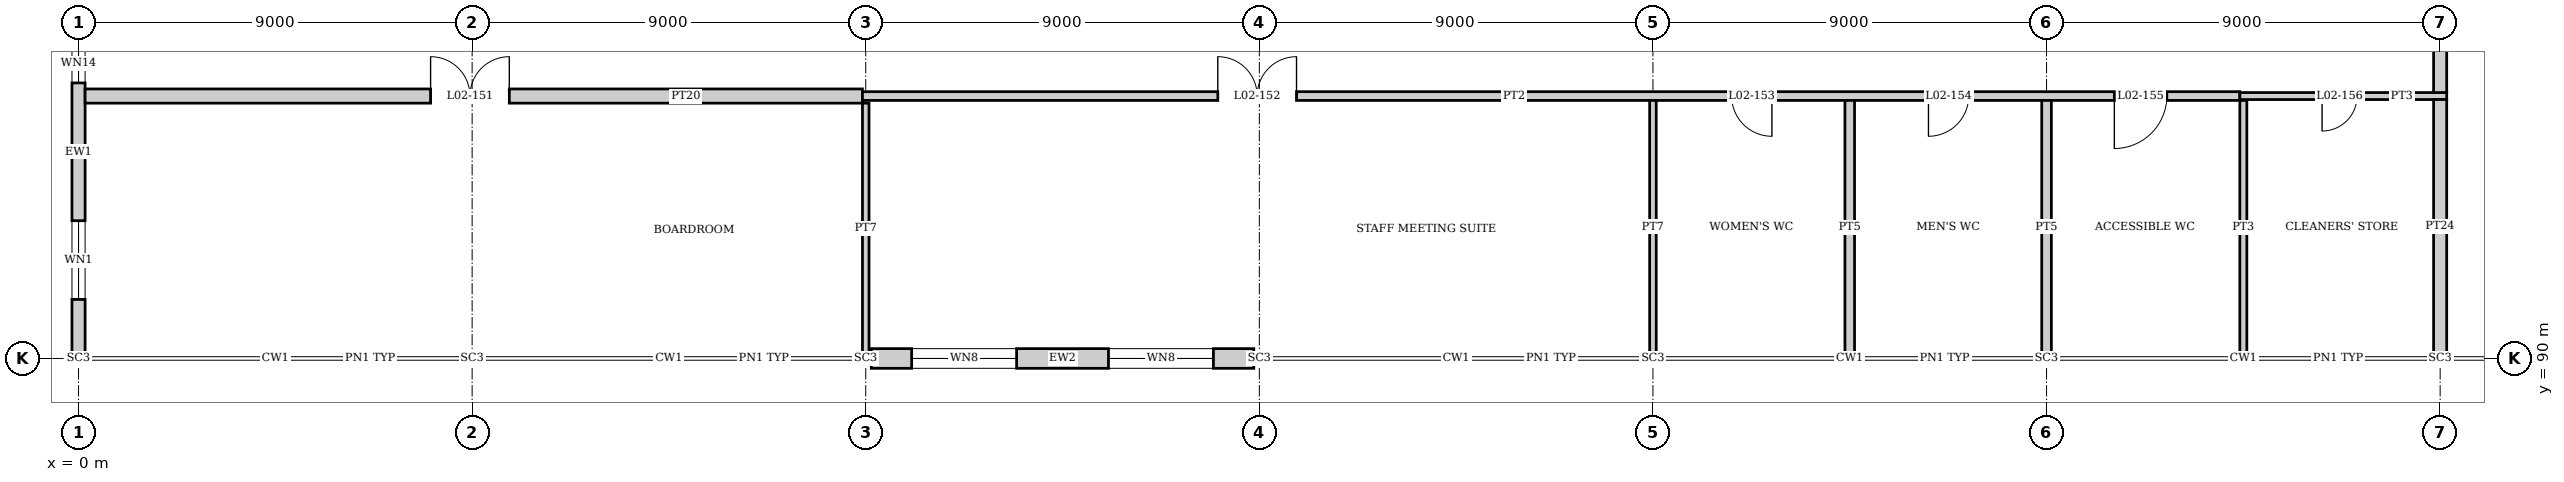
"""IFC4 building model, lengths in metres.
Left out: names, types, materials, properties, quantities, classifications, styles, units other than length and angle.
Written with IfcOpenShell. Run it as: python <this file> out.ifc"""

import sys

from ifc_helpers import new_model, si_unit, direction, frame, frame_2d, origin, origin_2d, place, context, subcontext, project, spatial, rectangle, i_section, extrude, element, fill, save


model = new_model("IFC4")
c1 = context("Model", 3, precision=1e-05, world=origin(), true_north=direction((0.0, 1.0)))
c2 = subcontext(c1, "Body", "Model", "MODEL_VIEW")
j1 = project(units=[si_unit("LENGTHUNIT", "METRE"), si_unit("PLANEANGLEUNIT", "RADIAN")], contexts=[c1])
p1 = place(None, origin())
s1 = spatial("IfcSite", under=j1, at=p1, CompositionType="ELEMENT")
p2 = place(p1, origin())
s2 = spatial("IfcBuilding", under=s1, at=p2, CompositionType="ELEMENT")
p3 = place(p2, frame((0.0, 0.0, 10.5)))
s3 = spatial("IfcBuildingStorey", under=s2, at=p3, CompositionType="ELEMENT", Elevation=10.5)
for number, where, z_axis, x_axis in (
    (1, (0.0, 90.0, 0.0), (0.0, 0.0, 1.0), (0.0, 1.0, 0.0)),
    (2, (9.0, 90.0, 0.0), (0.0, 0.0, 1.0), (0.0, 1.0, 0.0)),
    (3, (18.0, 90.0, 0.0), (0.0, 0.0, 1.0), (0.0, 1.0, 0.0)),
    (4, (27.0, 90.0, 0.0), (0.0, 0.0, 1.0), (0.0, 1.0, 0.0)),
    (5, (36.0, 90.0, 0.0), (0.0, 0.0, 1.0), (0.0, 1.0, 0.0)),
    (6, (45.0, 90.0, 0.0), (0.0, 0.0, 1.0), (0.0, 1.0, 0.0)),
    (7, (54.0, 90.0, 0.0), (0.0, 0.0, 1.0), (0.0, 1.0, 0.0)),
):
    element("IfcColumn", number, at=place(p3, frame(where, z_axis=z_axis, x_axis=x_axis)), inside=s3, PredefinedType="COLUMN", context=c2, shape_type="SweptSolid", body=[
        extrude(i_section(OverallWidth=0.254, OverallDepth=0.254, WebThickness=0.009, FlangeThickness=0.014, at=origin_2d()), origin(), (0.0, 0.0, 1.0), 4.5),
    ])
p4 = place(p3, frame((18.127, 90.0, 0.0), z_axis=(0.0, 0.0, 1.0), x_axis=(1.0, 0.0, 0.0)))
e8 = element("IfcWall", 8, at=p4, inside=s3, PredefinedType="SOLIDWALL", context=c2, shape_type="SweptSolid", body=[
    extrude(rectangle(XDim=8.746, YDim=0.45, at=frame_2d((4.373, 0.0))), origin(), (0.0, 0.0, 1.0), 3.991),
])
p5 = place(p4, frame((0.923, 0.0, 0.9)))
e9 = element("IfcOpeningElement", 9, at=p5, cuts=e8, PredefinedType="OPENING", context=c2, shape_type="SweptSolid", body=[
    extrude(rectangle(XDim=2.4, YDim=2.1, at=frame_2d((1.2, 1.05))), frame((0.0, 0.235, 0.0), z_axis=(0.0, -1.0, 0.0), x_axis=(1.0, 0.0, 0.0)), (0.0, 0.0, 1.0), 0.47),
])
p6 = place(p4, frame((5.423, 0.0, 0.9)))
e10 = element("IfcOpeningElement", 10, at=p6, cuts=e8, PredefinedType="OPENING", context=c2, shape_type="SweptSolid", body=[
    extrude(rectangle(XDim=2.4, YDim=2.1, at=frame_2d((1.2, 1.05))), frame((0.0, 0.235, 0.0), z_axis=(0.0, -1.0, 0.0), x_axis=(1.0, 0.0, 0.0)), (0.0, 0.0, 1.0), 0.47),
])
p7 = place(p3, frame((0.0, 90.127, 0.0), z_axis=(0.0, 0.0, 1.0), x_axis=(0.0, 1.0, 0.0)))
e11 = element("IfcWall", 11, at=p7, inside=s3, PredefinedType="SOLIDWALL", context=c2, shape_type="SweptSolid", body=[
    extrude(rectangle(XDim=8.873, YDim=0.3, at=frame_2d((4.437, 0.0))), origin(), (0.0, 0.0, 1.0), 3.991),
])
p8 = place(p7, frame((1.223, 0.0, 0.9)))
e12 = element("IfcOpeningElement", 12, at=p8, cuts=e11, PredefinedType="OPENING", context=c2, shape_type="SweptSolid", body=[
    extrude(rectangle(XDim=1.8, YDim=2.4, at=frame_2d((0.9, 1.2))), frame((0.0, 0.16, 0.0), z_axis=(0.0, -1.0, 0.0), x_axis=(1.0, 0.0, 0.0)), (0.0, 0.0, 1.0), 0.32),
])
p9 = place(p7, frame((6.173, 0.0, 0.6)))
e13 = element("IfcOpeningElement", 13, at=p9, cuts=e11, PredefinedType="OPENING", context=c2, shape_type="SweptSolid", body=[
    extrude(rectangle(XDim=0.9, YDim=2.7, at=frame_2d((0.45, 1.35))), frame((0.0, 0.16, 0.0), z_axis=(0.0, -1.0, 0.0), x_axis=(1.0, 0.0, 0.0)), (0.0, 0.0, 1.0), 0.32),
])
p10 = place(p3, frame((0.15, 96.0, 0.0), z_axis=(0.0, 0.0, 1.0), x_axis=(1.0, 0.0, 0.0)))
e14 = element("IfcWall", 14, at=p10, inside=s3, PredefinedType="PARTITIONING", context=c2, shape_type="SweptSolid", body=[
    extrude(rectangle(XDim=17.775, YDim=0.325, at=frame_2d((8.888, 0.0))), origin(), (0.0, 0.0, 1.0), 3.998),
])
p11 = place(p10, frame((7.9, 0.0, 0.0)))
e15 = element("IfcOpeningElement", 15, at=p11, cuts=e14, PredefinedType="OPENING", context=c2, shape_type="SweptSolid", body=[
    extrude(rectangle(XDim=1.8, YDim=2.4, at=frame_2d((0.9, 1.2))), frame((0.0, 0.172, 0.0), z_axis=(0.0, -1.0, 0.0), x_axis=(1.0, 0.0, 0.0)), (0.0, 0.0, 1.0), 0.345),
])
p12 = place(p3, frame((17.925, 96.0, 0.0), z_axis=(0.0, 0.0, 1.0), x_axis=(1.0, 0.0, 0.0)))
e16 = element("IfcWall", 16, at=p12, inside=s3, PredefinedType="PARTITIONING", context=c2, shape_type="SweptSolid", body=[
    extrude(rectangle(XDim=31.495, YDim=0.2, at=frame_2d((15.748, 0.0))), origin(), (0.0, 0.0, 1.0), 3.998),
])
p13 = place(p12, frame((8.125, 0.0, 0.0)))
e17 = element("IfcOpeningElement", 17, at=p13, cuts=e16, PredefinedType="OPENING", context=c2, shape_type="SweptSolid", body=[
    extrude(rectangle(XDim=1.8, YDim=2.1, at=frame_2d((0.9, 1.05))), frame((0.0, 0.11, 0.0), z_axis=(0.0, -1.0, 0.0), x_axis=(1.0, 0.0, 0.0)), (0.0, 0.0, 1.0), 0.22),
])
p14 = place(p12, frame((19.875, 0.0, 0.0)))
e18 = element("IfcOpeningElement", 18, at=p14, cuts=e16, PredefinedType="OPENING", context=c2, shape_type="SweptSolid", body=[
    extrude(rectangle(XDim=0.92, YDim=2.1, at=frame_2d((0.46, 1.05))), frame((0.0, 0.11, 0.0), z_axis=(0.0, -1.0, 0.0), x_axis=(1.0, 0.0, 0.0)), (0.0, 0.0, 1.0), 0.22),
])
p15 = place(p12, frame((24.375, 0.0, 0.0)))
e19 = element("IfcOpeningElement", 19, at=p15, cuts=e16, PredefinedType="OPENING", context=c2, shape_type="SweptSolid", body=[
    extrude(rectangle(XDim=0.92, YDim=2.1, at=frame_2d((0.46, 1.05))), frame((0.0, 0.11, 0.0), z_axis=(0.0, -1.0, 0.0), x_axis=(1.0, 0.0, 0.0)), (0.0, 0.0, 1.0), 0.22),
])
p16 = place(p12, frame((28.625, 0.0, 0.0)))
e20 = element("IfcOpeningElement", 20, at=p16, cuts=e16, PredefinedType="OPENING", context=c2, shape_type="SweptSolid", body=[
    extrude(rectangle(XDim=1.2, YDim=2.1, at=frame_2d((0.6, 1.05))), frame((0.0, 0.11, 0.0), z_axis=(0.0, -1.0, 0.0), x_axis=(1.0, 0.0, 0.0)), (0.0, 0.0, 1.0), 0.22),
])
p17 = place(p3, frame((49.42, 96.0, 0.0), z_axis=(0.0, 0.0, 1.0), x_axis=(1.0, 0.0, 0.0)))
e21 = element("IfcWall", 21, at=p17, inside=s3, PredefinedType="PARTITIONING", context=c2, shape_type="SweptSolid", body=[
    extrude(rectangle(XDim=4.73, YDim=0.16, at=frame_2d((2.365, 0.0))), origin(), (0.0, 0.0, 1.0), 3.998),
])
p18 = place(p17, frame((1.88, 0.0, 0.0)))
e22 = element("IfcOpeningElement", 22, at=p18, cuts=e21, PredefinedType="OPENING", context=c2, shape_type="SweptSolid", body=[
    extrude(rectangle(XDim=0.8, YDim=2.0, at=frame_2d((0.4, 1.0))), frame((0.0, 0.09, 0.0), z_axis=(0.0, -1.0, 0.0), x_axis=(1.0, 0.0, 0.0)), (0.0, 0.0, 1.0), 0.18),
])
p19 = place(p3, frame((18.0, 90.127, 0.0), z_axis=(0.0, 0.0, 1.0), x_axis=(0.0, 1.0, 0.0)))
e23 = element("IfcWall", 23, at=p19, inside=s3, PredefinedType="PARTITIONING", context=c2, shape_type="SweptSolid", body=[
    extrude(rectangle(XDim=5.71, YDim=0.15, at=frame_2d((2.855, 0.0))), origin(), (0.0, 0.0, 1.0), 3.998),
])
p20 = place(p3, frame((36.0, 90.127, 0.0), z_axis=(0.0, 0.0, 1.0), x_axis=(0.0, 1.0, 0.0)))
e24 = element("IfcWall", 24, at=p20, inside=s3, PredefinedType="PARTITIONING", context=c2, shape_type="SweptSolid", body=[
    extrude(rectangle(XDim=5.773, YDim=0.15, at=frame_2d((2.886, 0.0))), origin(), (0.0, 0.0, 1.0), 3.998),
])
p21 = place(p3, frame((40.5, 90.1, 0.0), z_axis=(0.0, 0.0, 1.0), x_axis=(0.0, 1.0, 0.0)))
e25 = element("IfcWall", 25, at=p21, inside=s3, PredefinedType="PLUMBINGWALL", context=c2, shape_type="SweptSolid", body=[
    extrude(rectangle(XDim=5.8, YDim=0.22, at=frame_2d((2.9, 0.0))), origin(), (0.0, 0.0, 1.0), 3.998),
])
p22 = place(p3, frame((45.0, 90.127, 0.0), z_axis=(0.0, 0.0, 1.0), x_axis=(0.0, 1.0, 0.0)))
e26 = element("IfcWall", 26, at=p22, inside=s3, PredefinedType="PLUMBINGWALL", context=c2, shape_type="SweptSolid", body=[
    extrude(rectangle(XDim=5.773, YDim=0.22, at=frame_2d((2.886, 0.0))), origin(), (0.0, 0.0, 1.0), 3.998),
])
p23 = place(p3, frame((49.5, 90.1, 0.0), z_axis=(0.0, 0.0, 1.0), x_axis=(0.0, 1.0, 0.0)))
e27 = element("IfcWall", 27, at=p23, inside=s3, PredefinedType="PARTITIONING", context=c2, shape_type="SweptSolid", body=[
    extrude(rectangle(XDim=5.8, YDim=0.16, at=frame_2d((2.9, 0.0))), origin(), (0.0, 0.0, 1.0), 3.998),
])
p24 = place(p3, frame((54.0, 90.127, 0.0), z_axis=(0.0, 0.0, 1.0), x_axis=(0.0, 1.0, 0.0)))
e28 = element("IfcWall", 28, at=p24, inside=s3, PredefinedType="PARTITIONING", context=c2, shape_type="SweptSolid", body=[
    extrude(rectangle(XDim=5.793, YDim=0.3, at=frame_2d((2.896, 0.0))), origin(), (0.0, 0.0, 1.0), 3.998),
])
p25 = place(p3, frame((54.0, 96.08, 0.0), z_axis=(0.0, 0.0, 1.0), x_axis=(0.0, 1.0, 0.0)))
e29 = element("IfcWall", 29, at=p25, inside=s3, PredefinedType="PARTITIONING", context=c2, shape_type="SweptSolid", body=[
    extrude(rectangle(XDim=2.92, YDim=0.3, at=frame_2d((1.46, 0.0))), origin(), (0.0, 0.0, 1.0), 3.822),
])
p26 = place(p5, origin())
e30 = element("IfcWindow", 30, at=p26, inside=s3, PartitioningType="SINGLE_PANEL", PredefinedType="WINDOW", context=c2, shape_type="SweptSolid", body=[
    extrude(rectangle(XDim=2.4, YDim=2.1, at=frame_2d((1.2, 1.05))), frame((0.0, 0.03, 0.0), z_axis=(0.0, -1.0, 0.0), x_axis=(1.0, 0.0, 0.0)), (0.0, 0.0, 1.0), 0.06),
])
fill(e9, e30)
p27 = place(p6, origin())
e31 = element("IfcWindow", 31, at=p27, inside=s3, PartitioningType="SINGLE_PANEL", PredefinedType="WINDOW", context=c2, shape_type="SweptSolid", body=[
    extrude(rectangle(XDim=2.4, YDim=2.1, at=frame_2d((1.2, 1.05))), frame((0.0, 0.03, 0.0), z_axis=(0.0, -1.0, 0.0), x_axis=(1.0, 0.0, 0.0)), (0.0, 0.0, 1.0), 0.06),
])
fill(e10, e31)
p28 = place(p8, origin())
e32 = element("IfcWindow", 32, at=p28, inside=s3, PartitioningType="SINGLE_PANEL", PredefinedType="WINDOW", context=c2, shape_type="SweptSolid", body=[
    extrude(rectangle(XDim=1.8, YDim=2.4, at=frame_2d((0.9, 1.2))), frame((0.0, 0.03, 0.0), z_axis=(0.0, -1.0, 0.0), x_axis=(1.0, 0.0, 0.0)), (0.0, 0.0, 1.0), 0.06),
])
fill(e12, e32)
p29 = place(p9, origin())
e33 = element("IfcWindow", 33, at=p29, inside=s3, PartitioningType="SINGLE_PANEL", PredefinedType="WINDOW", context=c2, shape_type="SweptSolid", body=[
    extrude(rectangle(XDim=0.9, YDim=2.7, at=frame_2d((0.45, 1.35))), frame((0.0, 0.03, 0.0), z_axis=(0.0, -1.0, 0.0), x_axis=(1.0, 0.0, 0.0)), (0.0, 0.0, 1.0), 0.06),
])
fill(e13, e33)
p30 = place(p11, origin())
e34 = element("IfcDoor", 34, at=p30, inside=s3, OperationType="DOUBLE_DOOR_SINGLE_SWING", PredefinedType="DOOR", context=c2, shape_type="SweptSolid", body=[
    extrude(rectangle(XDim=1.8, YDim=2.4, at=frame_2d((0.9, 1.2))), frame((0.0, 0.025, 0.0), z_axis=(0.0, -1.0, 0.0), x_axis=(1.0, 0.0, 0.0)), (0.0, 0.0, 1.0), 0.05),
])
fill(e15, e34)
p31 = place(p13, origin())
e35 = element("IfcDoor", 35, at=p31, inside=s3, OperationType="DOUBLE_DOOR_SINGLE_SWING", PredefinedType="DOOR", context=c2, shape_type="SweptSolid", body=[
    extrude(rectangle(XDim=1.8, YDim=2.1, at=frame_2d((0.9, 1.05))), frame((0.0, 0.025, 0.0), z_axis=(0.0, -1.0, 0.0), x_axis=(1.0, 0.0, 0.0)), (0.0, 0.0, 1.0), 0.05),
])
fill(e17, e35)
p32 = place(p14, frame((0.92, 0.0, 0.0), z_axis=(0.0, 0.0, 1.0), x_axis=(-1.0, 0.0, 0.0)))
e36 = element("IfcDoor", 36, at=p32, inside=s3, OperationType="SINGLE_SWING_LEFT", PredefinedType="DOOR", context=c2, shape_type="SweptSolid", body=[
    extrude(rectangle(XDim=0.92, YDim=2.1, at=frame_2d((0.46, 1.05))), frame((0.0, 0.025, 0.0), z_axis=(0.0, -1.0, 0.0), x_axis=(1.0, 0.0, 0.0)), (0.0, 0.0, 1.0), 0.05),
])
fill(e18, e36)
p33 = place(p15, frame((0.92, 0.0, 0.0), z_axis=(0.0, 0.0, 1.0), x_axis=(-1.0, 0.0, 0.0)))
e37 = element("IfcDoor", 37, at=p33, inside=s3, OperationType="SINGLE_SWING_RIGHT", PredefinedType="DOOR", context=c2, shape_type="SweptSolid", body=[
    extrude(rectangle(XDim=0.92, YDim=2.1, at=frame_2d((0.46, 1.05))), frame((0.0, 0.025, 0.0), z_axis=(0.0, -1.0, 0.0), x_axis=(1.0, 0.0, 0.0)), (0.0, 0.0, 1.0), 0.05),
])
fill(e19, e37)
p34 = place(p16, frame((1.2, 0.0, 0.0), z_axis=(0.0, 0.0, 1.0), x_axis=(-1.0, 0.0, 0.0)))
e38 = element("IfcDoor", 38, at=p34, inside=s3, OperationType="SINGLE_SWING_RIGHT", PredefinedType="DOOR", context=c2, shape_type="SweptSolid", body=[
    extrude(rectangle(XDim=1.2, YDim=2.1, at=frame_2d((0.6, 1.05))), frame((0.0, 0.025, 0.0), z_axis=(0.0, -1.0, 0.0), x_axis=(1.0, 0.0, 0.0)), (0.0, 0.0, 1.0), 0.05),
])
fill(e20, e38)
p35 = place(p18, frame((0.8, 0.0, 0.0), z_axis=(0.0, 0.0, 1.0), x_axis=(-1.0, 0.0, 0.0)))
e39 = element("IfcDoor", 39, at=p35, inside=s3, OperationType="SINGLE_SWING_RIGHT", PredefinedType="DOOR", context=c2, shape_type="SweptSolid", body=[
    extrude(rectangle(XDim=0.8, YDim=2.0, at=frame_2d((0.4, 1.0))), frame((0.0, 0.025, 0.0), z_axis=(0.0, -1.0, 0.0), x_axis=(1.0, 0.0, 0.0)), (0.0, 0.0, 1.0), 0.05),
])
fill(e22, e39)
save(model, sys.argv[1])
